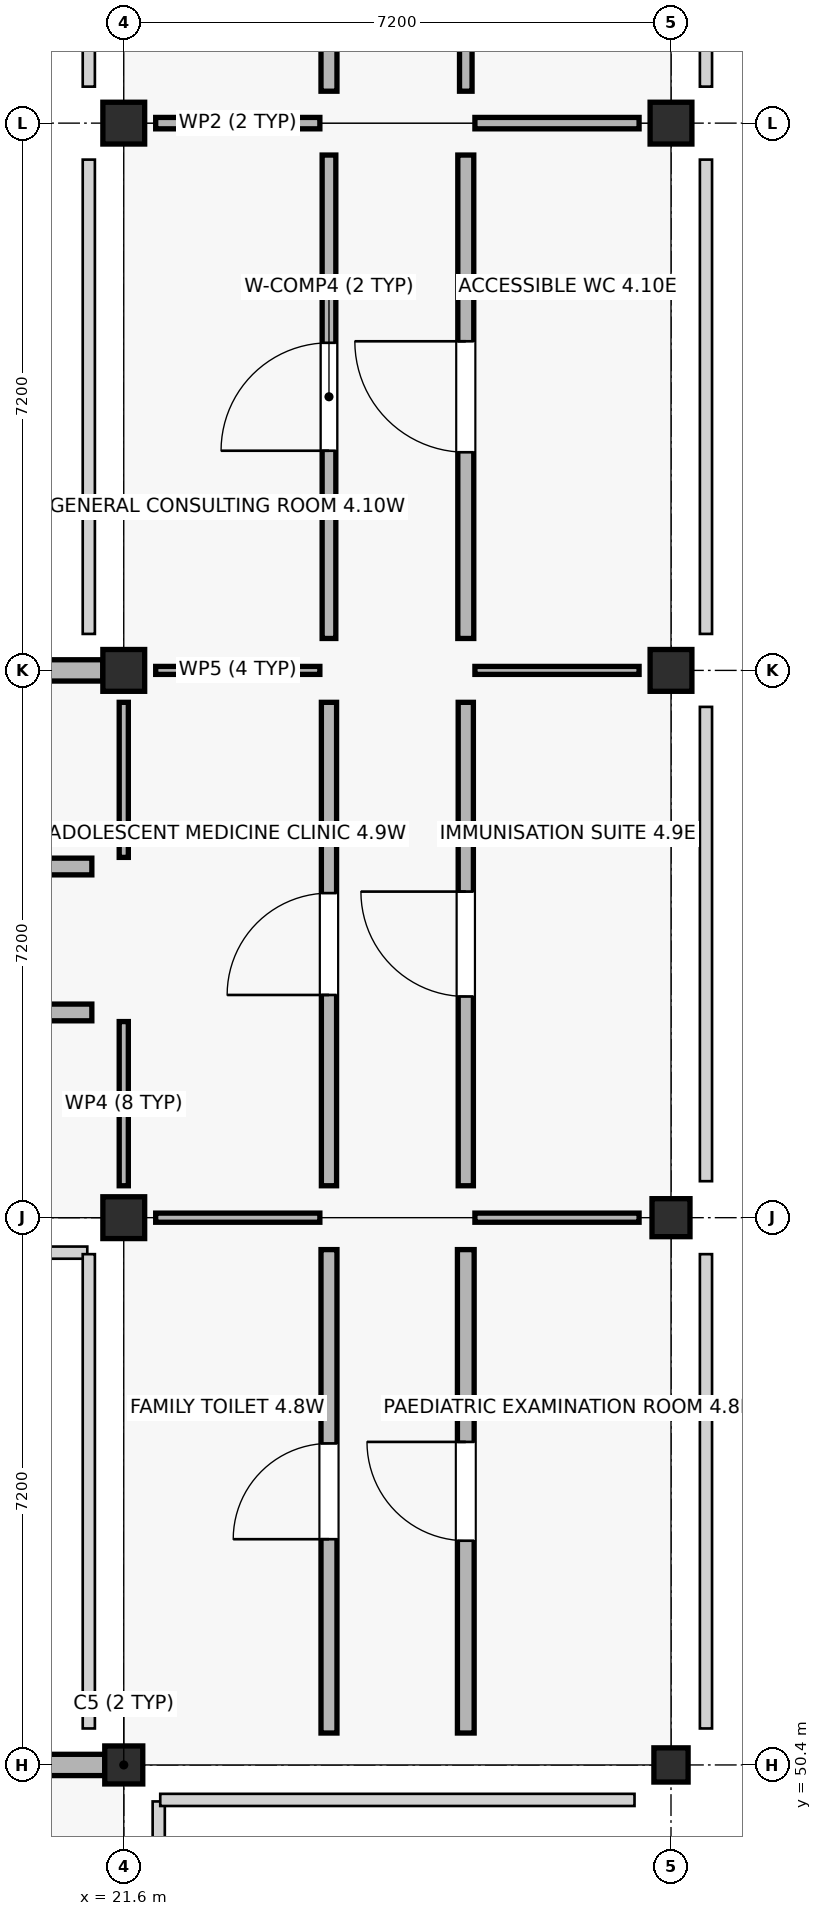
"""IFC4 building model, lengths in metres.
Left out: names, types, materials, properties, quantities, classifications, styles, units other than length and angle.
Written with IfcOpenShell. Run it as: python <this file> out.ifc"""

import sys

from ifc_helpers import new_model, si_unit, direction, frame, frame_2d, origin, origin_2d, place, context, subcontext, project, spatial, rectangle, extrude, element, fill, save


model = new_model("IFC4")
c1 = context("Model", 3, precision=1e-05, world=origin(), true_north=direction((0.0, 1.0)))
c2 = subcontext(c1, "Body", "Model", "MODEL_VIEW")
j1 = project(units=[si_unit("LENGTHUNIT", "METRE"), si_unit("PLANEANGLEUNIT", "RADIAN")], contexts=[c1])
p1 = place(None, origin())
s1 = spatial("IfcSite", under=j1, at=p1, CompositionType="ELEMENT")
p2 = place(p1, origin())
s2 = spatial("IfcBuilding", under=s1, at=p2, CompositionType="ELEMENT")
p3 = place(p2, frame((0.0, 0.0, 9.0)))
s3 = spatial("IfcBuildingStorey", under=s2, at=p3, CompositionType="ELEMENT", Elevation=9.0)
p4 = place(p3, frame((21.6, 50.4, 0.0), z_axis=(0.0, 0.0, 1.0), x_axis=(1.0, 0.0, 0.0)))
e1 = element("IfcColumn", 1, at=p4, inside=s3, PredefinedType="COLUMN", context=c2, shape_type="SweptSolid", body=[
    extrude(rectangle(XDim=0.5, YDim=0.5, at=origin_2d()), origin(), (0.0, 0.0, 1.0), 4.28),
])
for number, where, z_axis, x_axis in (
    (2, (21.6, 57.6, 0.0), (0.0, 0.0, 1.0), (1.0, 0.0, 0.0)),
    (3, (21.6, 64.8, 0.0), (0.0, 0.0, 1.0), (1.0, 0.0, 0.0)),
    (4, (21.6, 72.0, 0.0), (0.0, 0.0, 1.0), (1.0, 0.0, 0.0)),
):
    element("IfcColumn", number, at=place(p3, frame(where, z_axis=z_axis, x_axis=x_axis)), inside=s3, PredefinedType="COLUMN", context=c2, shape_type="SweptSolid", body=[
        extrude(rectangle(XDim=0.55, YDim=0.55, at=origin_2d()), origin(), (0.0, 0.0, 1.0), 4.5),
    ])
p5 = place(p3, frame((28.8, 50.4, 0.0), z_axis=(0.0, 0.0, 1.0), x_axis=(1.0, 0.0, 0.0)))
e5 = element("IfcColumn", 5, at=p5, inside=s3, PredefinedType="COLUMN", context=c2, shape_type="SweptSolid", body=[
    extrude(rectangle(XDim=0.45, YDim=0.45, at=origin_2d()), origin(), (0.0, 0.0, 1.0), 4.28),
])
p6 = place(p3, frame((28.8, 57.6, 0.0), z_axis=(0.0, 0.0, 1.0), x_axis=(1.0, 0.0, 0.0)))
e6 = element("IfcColumn", 6, at=p6, inside=s3, PredefinedType="COLUMN", context=c2, shape_type="SweptSolid", body=[
    extrude(rectangle(XDim=0.5, YDim=0.5, at=origin_2d()), origin(), (0.0, 0.0, 1.0), 4.28),
])
for number, where, z_axis, x_axis in (
    (7, (28.8, 64.8, 0.0), (0.0, 0.0, 1.0), (1.0, 0.0, 0.0)),
    (8, (28.8, 72.0, 0.0), (0.0, 0.0, 1.0), (1.0, 0.0, 0.0)),
):
    element("IfcColumn", number, at=place(p3, frame(where, z_axis=z_axis, x_axis=x_axis)), inside=s3, PredefinedType="COLUMN", context=c2, shape_type="SweptSolid", body=[
        extrude(rectangle(XDim=0.55, YDim=0.55, at=origin_2d()), origin(), (0.0, 0.0, 1.0), 4.5),
    ])
p7 = place(p3, frame((21.35, 50.4, 0.0), z_axis=(0.0, 0.0, 1.0), x_axis=(-1.0, 0.0, 0.0)))
e9 = element("IfcWall", 9, at=p7, inside=s3, PredefinedType="STANDARD", context=c2, shape_type="SweptSolid", body=[
    extrude(rectangle(XDim=6.675, YDim=0.28, at=frame_2d((3.337, 0.0))), origin(), (0.0, 0.0, 1.0), 3.59),
])
p8 = place(p7, frame((0.85, 0.0, 0.9)))
e10 = element("IfcOpeningElement", 10, at=p8, cuts=e9, PredefinedType="OPENING", context=c2, shape_type="SweptSolid", body=[
    extrude(rectangle(XDim=1.8, YDim=1.75, at=frame_2d((0.9, 0.875))), frame((0.0, 0.15, 0.0), z_axis=(0.0, -1.0, 0.0), x_axis=(1.0, 0.0, 0.0)), (0.0, 0.0, 1.0), 0.3),
])
p9 = place(p7, frame((4.025, 0.0, 0.9)))
e11 = element("IfcOpeningElement", 11, at=p9, cuts=e9, PredefinedType="OPENING", context=c2, shape_type="SweptSolid", body=[
    extrude(rectangle(XDim=1.8, YDim=1.75, at=frame_2d((0.9, 0.875))), frame((0.0, 0.15, 0.0), z_axis=(0.0, -1.0, 0.0), x_axis=(1.0, 0.0, 0.0)), (0.0, 0.0, 1.0), 0.3),
])
p10 = place(p3, frame((21.325, 64.8, 0.0), z_axis=(0.0, 0.0, 1.0), x_axis=(-1.0, 0.0, 0.0)))
e12 = element("IfcWall", 12, at=p10, inside=s3, PredefinedType="STANDARD", context=c2, shape_type="SweptSolid", body=[
    extrude(rectangle(XDim=6.65, YDim=0.28, at=frame_2d((3.325, 0.0))), origin(), (0.0, 0.0, 1.0), 3.59),
])
p11 = place(p10, frame((1.225, 0.0, 0.9)))
e13 = element("IfcOpeningElement", 13, at=p11, cuts=e12, PredefinedType="OPENING", context=c2, shape_type="SweptSolid", body=[
    extrude(rectangle(XDim=1.05, YDim=1.88, at=frame_2d((0.525, 0.94))), frame((0.0, 0.15, 0.0), z_axis=(0.0, -1.0, 0.0), x_axis=(1.0, 0.0, 0.0)), (0.0, 0.0, 1.0), 0.3),
])
p12 = place(p10, frame((4.375, 0.0, 0.9)))
e14 = element("IfcOpeningElement", 14, at=p12, cuts=e12, PredefinedType="OPENING", context=c2, shape_type="SweptSolid", body=[
    extrude(rectangle(XDim=1.05, YDim=1.88, at=frame_2d((0.525, 0.94))), frame((0.0, 0.15, 0.0), z_axis=(0.0, -1.0, 0.0), x_axis=(1.0, 0.0, 0.0)), (0.0, 0.0, 1.0), 0.3),
])
p13 = place(p3, frame((14.82, 60.3, 0.0), z_axis=(0.0, 0.0, 1.0), x_axis=(1.0, 0.0, 0.0)))
e15 = element("IfcWall", 15, at=p13, inside=s3, PredefinedType="SOLIDWALL", context=c2, shape_type="SweptSolid", body=[
    extrude(rectangle(XDim=6.36, YDim=0.22, at=frame_2d((3.18, 0.0))), origin(), (0.0, 0.0, 1.0), 3.38),
])
p14 = place(p13, frame((2.63, 0.0, 0.0)))
e16 = element("IfcOpeningElement", 16, at=p14, cuts=e15, PredefinedType="OPENING", context=c2, shape_type="SweptSolid", body=[
    extrude(rectangle(XDim=1.1, YDim=2.09, at=frame_2d((0.55, 1.045))), frame((0.0, 0.12, 0.0), z_axis=(0.0, -1.0, 0.0), x_axis=(1.0, 0.0, 0.0)), (0.0, 0.0, 1.0), 0.24),
])
p15 = place(p3, frame((21.6, 58.02, 0.0), z_axis=(0.0, 0.0, 1.0), x_axis=(0.0, 1.0, 0.0)))
e17 = element("IfcWall", 17, at=p15, inside=s3, PredefinedType="PARTITIONING", context=c2, shape_type="SweptSolid", body=[
    extrude(rectangle(XDim=2.16, YDim=0.12, at=frame_2d((1.08, 0.0))), origin(), (0.0, 0.0, 1.0), 3.38),
])
p16 = place(p3, frame((14.82, 62.22, 0.0), z_axis=(0.0, 0.0, 1.0), x_axis=(1.0, 0.0, 0.0)))
e18 = element("IfcWall", 18, at=p16, inside=s3, PredefinedType="SOLIDWALL", context=c2, shape_type="SweptSolid", body=[
    extrude(rectangle(XDim=6.36, YDim=0.22, at=frame_2d((3.18, 0.0))), origin(), (0.0, 0.0, 1.0), 3.38),
])
p17 = place(p16, frame((2.61, 0.0, 0.0)))
e19 = element("IfcOpeningElement", 19, at=p17, cuts=e18, PredefinedType="OPENING", context=c2, shape_type="SweptSolid", body=[
    extrude(rectangle(XDim=1.14, YDim=2.09, at=frame_2d((0.57, 1.045))), frame((0.0, 0.12, 0.0), z_axis=(0.0, -1.0, 0.0), x_axis=(1.0, 0.0, 0.0)), (0.0, 0.0, 1.0), 0.24),
])
p18 = place(p3, frame((21.6, 62.34, 0.0), z_axis=(0.0, 0.0, 1.0), x_axis=(0.0, 1.0, 0.0)))
e20 = element("IfcWall", 20, at=p18, inside=s3, PredefinedType="PARTITIONING", context=c2, shape_type="SweptSolid", body=[
    extrude(rectangle(XDim=2.04, YDim=0.12, at=frame_2d((1.02, 0.0))), origin(), (0.0, 0.0, 1.0), 3.38),
])
p19 = place(p3, frame((24.3, 50.82, 0.0), z_axis=(0.0, 0.0, 1.0), x_axis=(0.0, 1.0, 0.0)))
e21 = element("IfcWall", 21, at=p19, inside=s3, PredefinedType="PLUMBINGWALL", context=c2, shape_type="SweptSolid", body=[
    extrude(rectangle(XDim=6.36, YDim=0.21, at=frame_2d((3.18, 0.0))), origin(), (0.0, 0.0, 1.0), 3.38),
])
p20 = place(p19, frame((2.55, 0.0, 0.0)))
e22 = element("IfcOpeningElement", 22, at=p20, cuts=e21, PredefinedType="OPENING", context=c2, shape_type="SweptSolid", body=[
    extrude(rectangle(XDim=1.26, YDim=2.09, at=frame_2d((0.63, 1.045))), frame((0.0, 0.115, 0.0), z_axis=(0.0, -1.0, 0.0), x_axis=(1.0, 0.0, 0.0)), (0.0, 0.0, 1.0), 0.23),
])
p21 = place(p3, frame((22.02, 57.6, 0.0), z_axis=(0.0, 0.0, 1.0), x_axis=(1.0, 0.0, 0.0)))
e23 = element("IfcWall", 23, at=p21, inside=s3, PredefinedType="PARTITIONING", context=c2, shape_type="SweptSolid", body=[
    extrude(rectangle(XDim=2.16, YDim=0.12, at=frame_2d((1.08, 0.0))), origin(), (0.0, 0.0, 1.0), 3.38),
])
p22 = place(p3, frame((26.1, 50.82, 0.0), z_axis=(0.0, 0.0, 1.0), x_axis=(0.0, 1.0, 0.0)))
e24 = element("IfcWall", 24, at=p22, inside=s3, PredefinedType="SOLIDWALL", context=c2, shape_type="SweptSolid", body=[
    extrude(rectangle(XDim=6.36, YDim=0.22, at=frame_2d((3.18, 0.0))), origin(), (0.0, 0.0, 1.0), 3.38),
])
p23 = place(p22, frame((2.53, 0.0, 0.0)))
e25 = element("IfcOpeningElement", 25, at=p23, cuts=e24, PredefinedType="OPENING", context=c2, shape_type="SweptSolid", body=[
    extrude(rectangle(XDim=1.3, YDim=2.09, at=frame_2d((0.65, 1.045))), frame((0.0, 0.12, 0.0), z_axis=(0.0, -1.0, 0.0), x_axis=(1.0, 0.0, 0.0)), (0.0, 0.0, 1.0), 0.24),
])
p24 = place(p3, frame((26.22, 57.6, 0.0), z_axis=(0.0, 0.0, 1.0), x_axis=(1.0, 0.0, 0.0)))
e26 = element("IfcWall", 26, at=p24, inside=s3, PredefinedType="PARTITIONING", context=c2, shape_type="SweptSolid", body=[
    extrude(rectangle(XDim=2.16, YDim=0.12, at=frame_2d((1.08, 0.0))), origin(), (0.0, 0.0, 1.0), 3.38),
])
p25 = place(p3, frame((24.3, 58.02, 0.0), z_axis=(0.0, 0.0, 1.0), x_axis=(0.0, 1.0, 0.0)))
e27 = element("IfcWall", 27, at=p25, inside=s3, PredefinedType="SOLIDWALL", context=c2, shape_type="SweptSolid", body=[
    extrude(rectangle(XDim=6.36, YDim=0.2, at=frame_2d((3.18, 0.0))), origin(), (0.0, 0.0, 1.0), 3.38),
])
p26 = place(p25, frame((2.51, 0.0, 0.0)))
e28 = element("IfcOpeningElement", 28, at=p26, cuts=e27, PredefinedType="OPENING", context=c2, shape_type="SweptSolid", body=[
    extrude(rectangle(XDim=1.34, YDim=2.09, at=frame_2d((0.67, 1.045))), frame((0.0, 0.11, 0.0), z_axis=(0.0, -1.0, 0.0), x_axis=(1.0, 0.0, 0.0)), (0.0, 0.0, 1.0), 0.22),
])
p27 = place(p3, frame((22.02, 64.8, 0.0), z_axis=(0.0, 0.0, 1.0), x_axis=(1.0, 0.0, 0.0)))
e29 = element("IfcWall", 29, at=p27, inside=s3, PredefinedType="PARTITIONING", context=c2, shape_type="SweptSolid", body=[
    extrude(rectangle(XDim=2.16, YDim=0.105, at=frame_2d((1.08, 0.0))), origin(), (0.0, 0.0, 1.0), 3.38),
])
p28 = place(p3, frame((26.1, 58.02, 0.0), z_axis=(0.0, 0.0, 1.0), x_axis=(0.0, 1.0, 0.0)))
e30 = element("IfcWall", 30, at=p28, inside=s3, PredefinedType="SOLIDWALL", context=c2, shape_type="SweptSolid", body=[
    extrude(rectangle(XDim=6.36, YDim=0.2, at=frame_2d((3.18, 0.0))), origin(), (0.0, 0.0, 1.0), 3.38),
])
p29 = place(p28, frame((2.49, 0.0, 0.0)))
e31 = element("IfcOpeningElement", 31, at=p29, cuts=e30, PredefinedType="OPENING", context=c2, shape_type="SweptSolid", body=[
    extrude(rectangle(XDim=1.38, YDim=2.09, at=frame_2d((0.69, 1.045))), frame((0.0, 0.11, 0.0), z_axis=(0.0, -1.0, 0.0), x_axis=(1.0, 0.0, 0.0)), (0.0, 0.0, 1.0), 0.22),
])
p30 = place(p3, frame((26.22, 64.8, 0.0), z_axis=(0.0, 0.0, 1.0), x_axis=(1.0, 0.0, 0.0)))
e32 = element("IfcWall", 32, at=p30, inside=s3, PredefinedType="PARTITIONING", context=c2, shape_type="SweptSolid", body=[
    extrude(rectangle(XDim=2.16, YDim=0.105, at=frame_2d((1.08, 0.0))), origin(), (0.0, 0.0, 1.0), 3.38),
])
p31 = place(p3, frame((24.3, 65.22, 0.0), z_axis=(0.0, 0.0, 1.0), x_axis=(0.0, 1.0, 0.0)))
e33 = element("IfcWall", 33, at=p31, inside=s3, PredefinedType="PARTITIONING", context=c2, shape_type="SweptSolid", body=[
    extrude(rectangle(XDim=6.36, YDim=0.18, at=frame_2d((3.18, 0.0))), origin(), (0.0, 0.0, 1.0), 3.38),
])
p32 = place(p31, frame((2.47, 0.0, 0.0)))
e34 = element("IfcOpeningElement", 34, at=p32, cuts=e33, PredefinedType="OPENING", context=c2, shape_type="SweptSolid", body=[
    extrude(rectangle(XDim=1.42, YDim=2.09, at=frame_2d((0.71, 1.045))), frame((0.0, 0.1, 0.0), z_axis=(0.0, -1.0, 0.0), x_axis=(1.0, 0.0, 0.0)), (0.0, 0.0, 1.0), 0.2),
])
p33 = place(p3, frame((22.02, 72.0, 0.0), z_axis=(0.0, 0.0, 1.0), x_axis=(1.0, 0.0, 0.0)))
e35 = element("IfcWall", 35, at=p33, inside=s3, PredefinedType="PARTITIONING", context=c2, shape_type="SweptSolid", body=[
    extrude(rectangle(XDim=2.16, YDim=0.15, at=frame_2d((1.08, 0.0))), origin(), (0.0, 0.0, 1.0), 3.38),
])
p34 = place(p3, frame((26.1, 65.22, 0.0), z_axis=(0.0, 0.0, 1.0), x_axis=(0.0, 1.0, 0.0)))
e36 = element("IfcWall", 36, at=p34, inside=s3, PredefinedType="PLUMBINGWALL", context=c2, shape_type="SweptSolid", body=[
    extrude(rectangle(XDim=6.36, YDim=0.21, at=frame_2d((3.18, 0.0))), origin(), (0.0, 0.0, 1.0), 3.38),
])
p35 = place(p34, frame((2.45, 0.0, 0.0)))
e37 = element("IfcOpeningElement", 37, at=p35, cuts=e36, PredefinedType="OPENING", context=c2, shape_type="SweptSolid", body=[
    extrude(rectangle(XDim=1.46, YDim=2.09, at=frame_2d((0.73, 1.045))), frame((0.0, 0.115, 0.0), z_axis=(0.0, -1.0, 0.0), x_axis=(1.0, 0.0, 0.0)), (0.0, 0.0, 1.0), 0.23),
])
p36 = place(p3, frame((26.22, 72.0, 0.0), z_axis=(0.0, 0.0, 1.0), x_axis=(1.0, 0.0, 0.0)))
e38 = element("IfcWall", 38, at=p36, inside=s3, PredefinedType="PARTITIONING", context=c2, shape_type="SweptSolid", body=[
    extrude(rectangle(XDim=2.16, YDim=0.15, at=frame_2d((1.08, 0.0))), origin(), (0.0, 0.0, 1.0), 3.38),
])
p37 = place(p3, frame((24.3, 72.42, 0.0), z_axis=(0.0, 0.0, 1.0), x_axis=(0.0, 1.0, 0.0)))
e39 = element("IfcWall", 39, at=p37, inside=s3, PredefinedType="PLUMBINGWALL", context=c2, shape_type="SweptSolid", body=[
    extrude(rectangle(XDim=6.36, YDim=0.21, at=frame_2d((3.18, 0.0))), origin(), (0.0, 0.0, 1.0), 3.38),
])
p38 = place(p37, frame((2.43, 0.0, 0.0)))
e40 = element("IfcOpeningElement", 40, at=p38, cuts=e39, PredefinedType="OPENING", context=c2, shape_type="SweptSolid", body=[
    extrude(rectangle(XDim=1.5, YDim=2.09, at=frame_2d((0.75, 1.045))), frame((0.0, 0.115, 0.0), z_axis=(0.0, -1.0, 0.0), x_axis=(1.0, 0.0, 0.0)), (0.0, 0.0, 1.0), 0.23),
])
p39 = place(p3, frame((26.1, 72.42, 0.0), z_axis=(0.0, 0.0, 1.0), x_axis=(0.0, 1.0, 0.0)))
e41 = element("IfcWall", 41, at=p39, inside=s3, PredefinedType="PARTITIONING", context=c2, shape_type="SweptSolid", body=[
    extrude(rectangle(XDim=6.36, YDim=0.165, at=frame_2d((3.18, 0.0))), origin(), (0.0, 0.0, 1.0), 3.38),
])
p40 = place(p39, frame((2.73, 0.0, 0.0)))
e42 = element("IfcOpeningElement", 42, at=p40, cuts=e41, PredefinedType="OPENING", context=c2, shape_type="SweptSolid", body=[
    extrude(rectangle(XDim=0.9, YDim=2.14, at=frame_2d((0.45, 1.07))), frame((0.0, 0.093, 0.0), z_axis=(0.0, -1.0, 0.0), x_axis=(1.0, 0.0, 0.0)), (0.0, 0.0, 1.0), 0.185),
])
p41 = place(p20, origin())
e43 = element("IfcDoor", 43, at=p41, inside=s3, OperationType="SINGLE_SWING_LEFT", PredefinedType="DOOR", context=c2, shape_type="SweptSolid", body=[
    extrude(rectangle(XDim=1.26, YDim=2.09, at=frame_2d((0.63, 1.045))), frame((0.0, 0.025, 0.0), z_axis=(0.0, -1.0, 0.0), x_axis=(1.0, 0.0, 0.0)), (0.0, 0.0, 1.0), 0.05),
])
fill(e22, e43)
p42 = place(p23, origin())
e44 = element("IfcDoor", 44, at=p42, inside=s3, OperationType="SINGLE_SWING_RIGHT", PredefinedType="DOOR", context=c2, shape_type="SweptSolid", body=[
    extrude(rectangle(XDim=1.3, YDim=2.09, at=frame_2d((0.65, 1.045))), frame((0.0, 0.025, 0.0), z_axis=(0.0, -1.0, 0.0), x_axis=(1.0, 0.0, 0.0)), (0.0, 0.0, 1.0), 0.05),
])
fill(e25, e44)
p43 = place(p26, origin())
e45 = element("IfcDoor", 45, at=p43, inside=s3, OperationType="SINGLE_SWING_LEFT", PredefinedType="DOOR", context=c2, shape_type="SweptSolid", body=[
    extrude(rectangle(XDim=1.34, YDim=2.09, at=frame_2d((0.67, 1.045))), frame((0.0, 0.025, 0.0), z_axis=(0.0, -1.0, 0.0), x_axis=(1.0, 0.0, 0.0)), (0.0, 0.0, 1.0), 0.05),
])
fill(e28, e45)
p44 = place(p29, origin())
e46 = element("IfcDoor", 46, at=p44, inside=s3, OperationType="SINGLE_SWING_RIGHT", PredefinedType="DOOR", context=c2, shape_type="SweptSolid", body=[
    extrude(rectangle(XDim=1.38, YDim=2.09, at=frame_2d((0.69, 1.045))), frame((0.0, 0.025, 0.0), z_axis=(0.0, -1.0, 0.0), x_axis=(1.0, 0.0, 0.0)), (0.0, 0.0, 1.0), 0.05),
])
fill(e31, e46)
p45 = place(p32, origin())
e47 = element("IfcDoor", 47, at=p45, inside=s3, OperationType="SINGLE_SWING_LEFT", PredefinedType="DOOR", context=c2, shape_type="SweptSolid", body=[
    extrude(rectangle(XDim=1.42, YDim=2.09, at=frame_2d((0.71, 1.045))), frame((0.0, 0.025, 0.0), z_axis=(0.0, -1.0, 0.0), x_axis=(1.0, 0.0, 0.0)), (0.0, 0.0, 1.0), 0.05),
])
fill(e34, e47)
p46 = place(p35, origin())
e48 = element("IfcDoor", 48, at=p46, inside=s3, OperationType="SINGLE_SWING_RIGHT", PredefinedType="DOOR", context=c2, shape_type="SweptSolid", body=[
    extrude(rectangle(XDim=1.46, YDim=2.09, at=frame_2d((0.73, 1.045))), frame((0.0, 0.025, 0.0), z_axis=(0.0, -1.0, 0.0), x_axis=(1.0, 0.0, 0.0)), (0.0, 0.0, 1.0), 0.05),
])
fill(e37, e48)
save(model, sys.argv[1])
